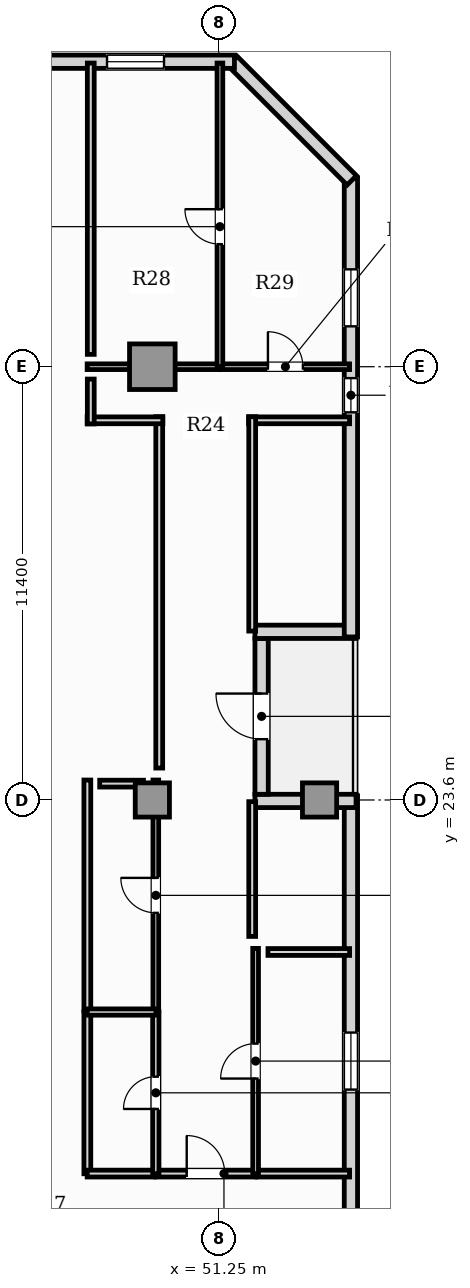
"""IFC4 building model, lengths in metres.
Left out: names, types, materials, properties, quantities, classifications, styles, units other than length and angle.
Written with IfcOpenShell. Run it as: python <this file> out.ifc"""

import sys

from ifc_helpers import new_model, si_unit, direction, frame, frame_2d, origin, origin_2d, place, context, subcontext, project, spatial, rectangle, hollow_rectangle, extrude, element, fill, save


model = new_model("IFC4")
c1 = context("Model", 3, precision=1e-05, world=origin(), true_north=direction((0.0, 1.0)))
c2 = subcontext(c1, "Body", "Model", "MODEL_VIEW")
j1 = project(units=[si_unit("LENGTHUNIT", "METRE"), si_unit("PLANEANGLEUNIT", "RADIAN")], contexts=[c1])
p1 = place(None, origin())
s1 = spatial("IfcSite", under=j1, at=p1, CompositionType="ELEMENT")
p2 = place(p1, origin())
s2 = spatial("IfcBuilding", under=s1, at=p2, CompositionType="ELEMENT")
p3 = place(p2, frame((0.0, 0.0, 96.45)))
s3 = spatial("IfcBuildingStorey", under=s2, at=p3, CompositionType="ELEMENT", Elevation=96.45)
p4 = place(p3, frame((49.5, 35.0, 0.0), z_axis=(0.0, 0.0, 1.0), x_axis=(1.0, 0.0, 0.0)))
e1 = element("IfcColumn", 1, at=p4, inside=s3, PredefinedType="USERDEFINED", context=c2, shape_type="SweptSolid", body=[
    extrude(hollow_rectangle(XDim=1.2, YDim=1.2, WallThickness=0.07, at=origin_2d()), origin(), (0.0, 0.0, 1.0), 3.85),
])
for number, where, z_axis, x_axis in (
    (2, (49.5, 23.6, 0.0), (0.0, 0.0, 1.0), (1.0, 0.0, 0.0)),
    (3, (53.9, 23.6, 0.0), (0.0, 0.0, 1.0), (1.0, 0.0, 0.0)),
):
    element("IfcColumn", number, at=place(p3, frame(where, z_axis=z_axis, x_axis=x_axis)), inside=s3, PredefinedType="COLUMN", context=c2, shape_type="SweptSolid", body=[
        extrude(rectangle(XDim=0.9, YDim=0.9, at=origin_2d()), origin(), (0.0, 0.0, 1.0), 3.85),
    ])
p5 = place(p3, frame((54.725, 3.24, 0.0), z_axis=(0.0, 0.0, 1.0), x_axis=(0.0, 1.0, 0.0)))
e4 = element("IfcWall", 4, at=p5, inside=s3, PredefinedType="SOLIDWALL", context=c2, shape_type="SweptSolid", body=[
    extrude(rectangle(XDim=20.47, YDim=0.35, at=frame_2d((10.235, 0.0))), origin(), (0.0, 0.0, 1.0), 3.6),
])
p6 = place(p5, frame((12.74, 0.0, 0.9)))
e5 = element("IfcOpeningElement", 5, at=p6, cuts=e4, PredefinedType="OPENING", context=c2, shape_type="SweptSolid", body=[
    extrude(rectangle(XDim=1.5, YDim=1.95, at=frame_2d((0.75, 0.975))), frame((0.0, 0.185, 0.0), z_axis=(0.0, -1.0, 0.0), x_axis=(1.0, 0.0, 0.0)), (0.0, 0.0, 1.0), 0.37),
])
p7 = place(p3, frame((54.86, 23.575, 0.0), z_axis=(0.0, 0.0, 1.0), x_axis=(-1.0, 0.0, 0.0)))
e6 = element("IfcWall", 6, at=p7, inside=s3, PredefinedType="SOLIDWALL", context=c2, shape_type="SweptSolid", body=[
    extrude(rectangle(XDim=2.66, YDim=0.35, at=frame_2d((1.33, 0.0))), origin(), (0.0, 0.0, 1.0), 3.056),
])
p8 = place(p3, frame((52.375, 23.75, 0.0), z_axis=(0.0, 0.0, 1.0), x_axis=(0.0, 1.0, 0.0)))
e7 = element("IfcWall", 7, at=p8, inside=s3, PredefinedType="SOLIDWALL", context=c2, shape_type="SweptSolid", body=[
    extrude(rectangle(XDim=4.1, YDim=0.35, at=frame_2d((2.05, 0.0))), origin(), (0.0, 0.0, 1.0), 3.6),
])
p9 = place(p8, frame((1.45, 0.0, 0.0)))
e8 = element("IfcOpeningElement", 8, at=p9, cuts=e7, PredefinedType="OPENING", context=c2, shape_type="SweptSolid", body=[
    extrude(rectangle(XDim=1.2, YDim=2.2, at=frame_2d((0.6, 1.1))), frame((0.0, 0.185, 0.0), z_axis=(0.0, -1.0, 0.0), x_axis=(1.0, 0.0, 0.0)), (0.0, 0.0, 1.0), 0.37),
])
p10 = place(p3, frame((52.2, 28.025, 0.0), z_axis=(0.0, 0.0, 1.0), x_axis=(1.0, 0.0, 0.0)))
e9 = element("IfcWall", 9, at=p10, inside=s3, PredefinedType="SOLIDWALL", context=c2, shape_type="SweptSolid", body=[
    extrude(rectangle(XDim=2.66, YDim=0.35, at=frame_2d((1.33, 0.0))), origin(), (0.0, 0.0, 1.0), 3.6),
])
p11 = place(p3, frame((54.725, 27.89, 0.0), z_axis=(0.0, 0.0, 1.0), x_axis=(0.0, 1.0, 0.0)))
e10 = element("IfcWall", 10, at=p11, inside=s3, PredefinedType="SOLIDWALL", context=c2, shape_type="SweptSolid", body=[
    extrude(rectangle(XDim=12.07, YDim=0.35, at=frame_2d((6.035, 0.0))), origin(), (0.0, 0.0, 1.0), 3.6),
])
p12 = place(p11, frame((5.91, 0.0, 0.95)))
e11 = element("IfcOpeningElement", 11, at=p12, cuts=e10, PredefinedType="OPENING", context=c2, shape_type="SweptSolid", body=[
    extrude(rectangle(XDim=0.9, YDim=1.5, at=frame_2d((0.45, 0.75))), frame((0.0, 0.185, 0.0), z_axis=(0.0, -1.0, 0.0), x_axis=(1.0, 0.0, 0.0)), (0.0, 0.0, 1.0), 0.37),
])
p13 = place(p11, frame((8.173, 0.0, 0.9)))
e12 = element("IfcOpeningElement", 12, at=p13, cuts=e10, PredefinedType="OPENING", context=c2, shape_type="SweptSolid", body=[
    extrude(rectangle(XDim=1.5, YDim=1.95, at=frame_2d((0.75, 0.975))), frame((0.0, 0.185, 0.0), z_axis=(0.0, -1.0, 0.0), x_axis=(1.0, 0.0, 0.0)), (0.0, 0.0, 1.0), 0.37),
])
p14 = place(p3, frame((54.748, 39.905, 0.0), z_axis=(0.0, 0.0, 1.0), x_axis=(-0.707106781187, 0.707106781187, 0.0)))
e13 = element("IfcWall", 13, at=p14, inside=s3, PredefinedType="SOLIDWALL", context=c2, shape_type="SweptSolid", body=[
    extrude(rectangle(XDim=4.446, YDim=0.35, at=frame_2d((2.223, 0.0))), origin(), (0.0, 0.0, 1.0), 3.6),
])
p15 = place(p3, frame((51.66, 43.025, 0.0), z_axis=(0.0, 0.0, 1.0), x_axis=(-1.0, 0.0, 0.0)))
e14 = element("IfcWall", 14, at=p15, inside=s3, PredefinedType="SOLIDWALL", context=c2, shape_type="SweptSolid", body=[
    extrude(rectangle(XDim=45.82, YDim=0.35, at=frame_2d((22.91, 0.0))), origin(), (0.0, 0.0, 1.0), 3.6),
])
p16 = place(p15, frame((42.468, 0.0, 0.9)))
e15 = element("IfcOpeningElement", 15, at=p16, cuts=e14, PredefinedType="OPENING", context=c2, shape_type="SweptSolid", body=[
    extrude(rectangle(XDim=1.5, YDim=1.95, at=frame_2d((0.75, 0.975))), frame((0.0, 0.185, 0.0), z_axis=(0.0, -1.0, 0.0), x_axis=(1.0, 0.0, 0.0)), (0.0, 0.0, 1.0), 0.37),
])
p17 = place(p15, frame((1.853, 0.0, 0.9)))
e16 = element("IfcOpeningElement", 16, at=p17, cuts=e14, PredefinedType="OPENING", context=c2, shape_type="SweptSolid", body=[
    extrude(rectangle(XDim=1.5, YDim=1.95, at=frame_2d((0.75, 0.975))), frame((0.0, 0.185, 0.0), z_axis=(0.0, -1.0, 0.0), x_axis=(1.0, 0.0, 0.0)), (0.0, 0.0, 1.0), 0.37),
])
p18 = place(p15, frame((36.578, 0.0, 0.9)))
e17 = element("IfcOpeningElement", 17, at=p18, cuts=e14, PredefinedType="OPENING", context=c2, shape_type="SweptSolid", body=[
    extrude(rectangle(XDim=1.5, YDim=1.95, at=frame_2d((0.75, 0.975))), frame((0.0, 0.185, 0.0), z_axis=(0.0, -1.0, 0.0), x_axis=(1.0, 0.0, 0.0)), (0.0, 0.0, 1.0), 0.37),
])
p19 = place(p15, frame((31.898, 0.0, 0.9)))
e18 = element("IfcOpeningElement", 18, at=p19, cuts=e14, PredefinedType="OPENING", context=c2, shape_type="SweptSolid", body=[
    extrude(rectangle(XDim=1.5, YDim=1.95, at=frame_2d((0.75, 0.975))), frame((0.0, 0.185, 0.0), z_axis=(0.0, -1.0, 0.0), x_axis=(1.0, 0.0, 0.0)), (0.0, 0.0, 1.0), 0.37),
])
p20 = place(p15, frame((27.837, 0.0, 0.9)))
e19 = element("IfcOpeningElement", 19, at=p20, cuts=e14, PredefinedType="OPENING", context=c2, shape_type="SweptSolid", body=[
    extrude(rectangle(XDim=1.5, YDim=1.95, at=frame_2d((0.75, 0.975))), frame((0.0, 0.185, 0.0), z_axis=(0.0, -1.0, 0.0), x_axis=(1.0, 0.0, 0.0)), (0.0, 0.0, 1.0), 0.37),
])
p21 = place(p15, frame((24.236, 0.0, 0.9)))
e20 = element("IfcOpeningElement", 20, at=p21, cuts=e14, PredefinedType="OPENING", context=c2, shape_type="SweptSolid", body=[
    extrude(rectangle(XDim=1.5, YDim=1.95, at=frame_2d((0.75, 0.975))), frame((0.0, 0.185, 0.0), z_axis=(0.0, -1.0, 0.0), x_axis=(1.0, 0.0, 0.0)), (0.0, 0.0, 1.0), 0.37),
])
p22 = place(p15, frame((19.927, 0.0, 0.9)))
e21 = element("IfcOpeningElement", 21, at=p22, cuts=e14, PredefinedType="OPENING", context=c2, shape_type="SweptSolid", body=[
    extrude(rectangle(XDim=1.5, YDim=1.95, at=frame_2d((0.75, 0.975))), frame((0.0, 0.185, 0.0), z_axis=(0.0, -1.0, 0.0), x_axis=(1.0, 0.0, 0.0)), (0.0, 0.0, 1.0), 0.37),
])
p23 = place(p15, frame((15.381, 0.0, 0.9)))
e22 = element("IfcOpeningElement", 22, at=p23, cuts=e14, PredefinedType="OPENING", context=c2, shape_type="SweptSolid", body=[
    extrude(rectangle(XDim=1.5, YDim=1.95, at=frame_2d((0.75, 0.975))), frame((0.0, 0.185, 0.0), z_axis=(0.0, -1.0, 0.0), x_axis=(1.0, 0.0, 0.0)), (0.0, 0.0, 1.0), 0.37),
])
p24 = place(p15, frame((11.477, 0.0, 0.9)))
e23 = element("IfcOpeningElement", 23, at=p24, cuts=e14, PredefinedType="OPENING", context=c2, shape_type="SweptSolid", body=[
    extrude(rectangle(XDim=1.5, YDim=1.95, at=frame_2d((0.75, 0.975))), frame((0.0, 0.185, 0.0), z_axis=(0.0, -1.0, 0.0), x_axis=(1.0, 0.0, 0.0)), (0.0, 0.0, 1.0), 0.37),
])
p25 = place(p15, frame((7.445, 0.0, 0.9)))
e24 = element("IfcOpeningElement", 24, at=p25, cuts=e14, PredefinedType="OPENING", context=c2, shape_type="SweptSolid", body=[
    extrude(rectangle(XDim=1.5, YDim=1.95, at=frame_2d((0.75, 0.975))), frame((0.0, 0.185, 0.0), z_axis=(0.0, -1.0, 0.0), x_axis=(1.0, 0.0, 0.0)), (0.0, 0.0, 1.0), 0.37),
])
p26 = place(p3, frame((49.587, 13.77, 0.0), z_axis=(0.0, 0.0, 1.0), x_axis=(1.0, 0.0, 0.0)))
e25 = element("IfcWall", 25, at=p26, inside=s3, PredefinedType="PARTITIONING", context=c2, shape_type="SweptSolid", body=[
    extrude(rectangle(XDim=2.636, YDim=0.18, at=frame_2d((1.318, 0.0))), origin(), (0.0, 0.0, 1.0), 3.6),
])
p27 = place(p26, frame((0.818, 0.0, 0.0)))
e26 = element("IfcOpeningElement", 26, at=p27, cuts=e25, PredefinedType="OPENING", context=c2, shape_type="SweptSolid", body=[
    extrude(rectangle(XDim=1.0, YDim=2.15, at=frame_2d((0.5, 1.075))), frame((0.0, 0.1, 0.0), z_axis=(0.0, -1.0, 0.0), x_axis=(1.0, 0.0, 0.0)), (0.0, 0.0, 1.0), 0.2),
])
p28 = place(p3, frame((47.79, 13.765, 0.0), z_axis=(0.0, 0.0, 1.0), x_axis=(0.0, 1.0, 0.0)))
e27 = element("IfcWall", 27, at=p28, inside=s3, PredefinedType="PARTITIONING", context=c2, shape_type="SweptSolid", body=[
    extrude(rectangle(XDim=4.26, YDim=0.18, at=frame_2d((2.13, 0.0))), origin(), (0.0, 0.0, 1.0), 3.6),
])
p29 = place(p3, frame((47.785, 13.77, 0.0), z_axis=(0.0, 0.0, 1.0), x_axis=(1.0, 0.0, 0.0)))
e28 = element("IfcWall", 28, at=p29, inside=s3, PredefinedType="PARTITIONING", context=c2, shape_type="SweptSolid", body=[
    extrude(rectangle(XDim=1.772, YDim=0.18, at=frame_2d((0.886, 0.0))), origin(), (0.0, 0.0, 1.0), 3.6),
])
p30 = place(p3, frame((47.79, 18.055, 0.0), z_axis=(0.0, 0.0, 1.0), x_axis=(0.0, 1.0, 0.0)))
e29 = element("IfcWall", 29, at=p30, inside=s3, PredefinedType="PARTITIONING", context=c2, shape_type="SweptSolid", body=[
    extrude(rectangle(XDim=6.07, YDim=0.18, at=frame_2d((3.035, 0.0))), origin(), (0.0, 0.0, 1.0), 3.6),
])
p31 = place(p3, frame((52.253, 13.77, 0.0), z_axis=(0.0, 0.0, 1.0), x_axis=(1.0, 0.0, 0.0)))
e30 = element("IfcWall", 30, at=p31, inside=s3, PredefinedType="PARTITIONING", context=c2, shape_type="SweptSolid", body=[
    extrude(rectangle(XDim=2.437, YDim=0.18, at=frame_2d((1.219, 0.0))), origin(), (0.0, 0.0, 1.0), 3.6),
])
p32 = place(p3, frame((49.592, 13.765, 0.0), z_axis=(0.0, 0.0, 1.0), x_axis=(0.0, 1.0, 0.0)))
e31 = element("IfcWall", 31, at=p32, inside=s3, PredefinedType="PLUMBINGWALL", context=c2, shape_type="SweptSolid", body=[
    extrude(rectangle(XDim=4.26, YDim=0.165, at=frame_2d((2.13, 0.0))), origin(), (0.0, 0.0, 1.0), 3.056),
])
p33 = place(p32, frame((1.705, 0.0, 0.0)))
e32 = element("IfcOpeningElement", 32, at=p33, cuts=e31, PredefinedType="OPENING", context=c2, shape_type="SweptSolid", body=[
    extrude(rectangle(XDim=0.85, YDim=2.1, at=frame_2d((0.425, 1.05))), frame((0.0, 0.093, 0.0), z_axis=(0.0, -1.0, 0.0), x_axis=(1.0, 0.0, 0.0)), (0.0, 0.0, 1.0), 0.185),
])
p34 = place(p3, frame((49.592, 18.055, 0.0), z_axis=(0.0, 0.0, 1.0), x_axis=(0.0, 1.0, 0.0)))
e33 = element("IfcWall", 33, at=p34, inside=s3, PredefinedType="PARTITIONING", context=c2, shape_type="SweptSolid", body=[
    extrude(rectangle(XDim=6.07, YDim=0.15, at=frame_2d((3.035, 0.0))), origin(), (0.0, 0.0, 1.0), 3.056),
])
p35 = place(p34, frame((2.575, 0.0, 0.0)))
e34 = element("IfcOpeningElement", 34, at=p35, cuts=e33, PredefinedType="OPENING", context=c2, shape_type="SweptSolid", body=[
    extrude(rectangle(XDim=0.92, YDim=2.1, at=frame_2d((0.46, 1.05))), frame((0.0, 0.085, 0.0), z_axis=(0.0, -1.0, 0.0), x_axis=(1.0, 0.0, 0.0)), (0.0, 0.0, 1.0), 0.17),
])
p36 = place(p3, frame((52.218, 13.765, 0.0), z_axis=(0.0, 0.0, 1.0), x_axis=(0.0, 1.0, 0.0)))
e35 = element("IfcWall", 35, at=p36, inside=s3, PredefinedType="PARTITIONING", context=c2, shape_type="SweptSolid", body=[
    extrude(rectangle(XDim=5.93, YDim=0.15, at=frame_2d((2.965, 0.0))), origin(), (0.0, 0.0, 1.0), 3.6),
])
p37 = place(p36, frame((2.505, 0.0, 0.0)))
e36 = element("IfcOpeningElement", 36, at=p37, cuts=e35, PredefinedType="OPENING", context=c2, shape_type="SweptSolid", body=[
    extrude(rectangle(XDim=0.92, YDim=2.1, at=frame_2d((0.46, 1.05))), frame((0.0, 0.085, 0.0), z_axis=(0.0, -1.0, 0.0), x_axis=(1.0, 0.0, 0.0)), (0.0, 0.0, 1.0), 0.17),
])
p38 = place(p3, frame((47.785, 35.0, 0.0), z_axis=(0.0, 0.0, 1.0), x_axis=(1.0, 0.0, 0.0)))
e37 = element("IfcWall", 37, at=p38, inside=s3, PredefinedType="PARTITIONING", context=c2, shape_type="SweptSolid", body=[
    extrude(rectangle(XDim=3.498, YDim=0.15, at=frame_2d((1.749, 0.0))), origin(), (0.0, 0.0, 1.0), 2.983),
])
p39 = place(p3, frame((51.313, 35.0, 0.0), z_axis=(0.0, 0.0, 1.0), x_axis=(1.0, 0.0, 0.0)))
e38 = element("IfcWall", 38, at=p39, inside=s3, PredefinedType="PARTITIONING", context=c2, shape_type="SweptSolid", body=[
    extrude(rectangle(XDim=3.377, YDim=0.15, at=frame_2d((1.688, 0.0))), origin(), (0.0, 0.0, 1.0), 3.6),
])
p40 = place(p39, frame((1.229, 0.0, 0.0)))
e39 = element("IfcOpeningElement", 39, at=p40, cuts=e38, PredefinedType="OPENING", context=c2, shape_type="SweptSolid", body=[
    extrude(rectangle(XDim=0.92, YDim=2.1, at=frame_2d((0.46, 1.05))), frame((0.0, 0.085, 0.0), z_axis=(0.0, -1.0, 0.0), x_axis=(1.0, 0.0, 0.0)), (0.0, 0.0, 1.0), 0.17),
])
p41 = place(p3, frame((47.785, 18.02, 0.0), z_axis=(0.0, 0.0, 1.0), x_axis=(1.0, 0.0, 0.0)))
e40 = element("IfcWall", 40, at=p41, inside=s3, PredefinedType="PLUMBINGWALL", context=c2, shape_type="SweptSolid", body=[
    extrude(rectangle(XDim=1.812, YDim=0.165, at=frame_2d((0.906, 0.0))), origin(), (0.0, 0.0, 1.0), 3.6),
])
p42 = place(p3, frame((51.278, 34.995, 0.0), z_axis=(0.0, 0.0, 1.0), x_axis=(0.0, 1.0, 0.0)))
e41 = element("IfcWall", 41, at=p42, inside=s3, PredefinedType="PARTITIONING", context=c2, shape_type="SweptSolid", body=[
    extrude(rectangle(XDim=7.995, YDim=0.15, at=frame_2d((3.998, 0.0))), origin(), (0.0, 0.0, 1.0), 3.6),
])
p43 = place(p42, frame((3.23, 0.0, 0.0)))
e42 = element("IfcOpeningElement", 42, at=p43, cuts=e41, PredefinedType="OPENING", context=c2, shape_type="SweptSolid", body=[
    extrude(rectangle(XDim=0.92, YDim=2.1, at=frame_2d((0.46, 1.05))), frame((0.0, 0.085, 0.0), z_axis=(0.0, -1.0, 0.0), x_axis=(1.0, 0.0, 0.0)), (0.0, 0.0, 1.0), 0.17),
])
p44 = place(p3, frame((49.682, 24.44, 0.0), z_axis=(0.0, 0.0, 1.0), x_axis=(0.0, 1.0, 0.0)))
e43 = element("IfcWall", 43, at=p44, inside=s3, PredefinedType="PARTITIONING", context=c2, shape_type="SweptSolid", body=[
    extrude(rectangle(XDim=9.245, YDim=0.18, at=frame_2d((4.623, 0.0))), origin(), (0.0, 0.0, 1.0), 3.056),
])
p45 = place(p3, frame((49.777, 33.59, 0.0), z_axis=(0.0, 0.0, 1.0), x_axis=(-1.0, 0.0, 0.0)))
e44 = element("IfcWall", 44, at=p45, inside=s3, PredefinedType="PARTITIONING", context=c2, shape_type="SweptSolid", body=[
    extrude(rectangle(XDim=1.992, YDim=0.18, at=frame_2d((0.996, 0.0))), origin(), (0.0, 0.0, 1.0), 3.6),
])
p46 = place(p3, frame((47.88, 33.495, 0.0), z_axis=(0.0, 0.0, 1.0), x_axis=(0.0, 1.0, 0.0)))
e45 = element("IfcWall", 45, at=p46, inside=s3, PredefinedType="PARTITIONING", context=c2, shape_type="SweptSolid", body=[
    extrude(rectangle(XDim=1.18, YDim=0.18, at=frame_2d((0.59, 0.0))), origin(), (0.0, 0.0, 1.0), 3.6),
])
p47 = place(p3, frame((54.69, 33.59, 0.0), z_axis=(0.0, 0.0, 1.0), x_axis=(-1.0, 0.0, 0.0)))
e46 = element("IfcWall", 46, at=p47, inside=s3, PredefinedType="PARTITIONING", context=c2, shape_type="SweptSolid", body=[
    extrude(rectangle(XDim=2.657, YDim=0.18, at=frame_2d((1.329, 0.0))), origin(), (0.0, 0.0, 1.0), 3.6),
])
p48 = place(p3, frame((52.128, 33.685, 0.0), z_axis=(0.0, 0.0, 1.0), x_axis=(0.0, -1.0, 0.0)))
e47 = element("IfcWall", 47, at=p48, inside=s3, PredefinedType="PARTITIONING", context=c2, shape_type="SweptSolid", body=[
    extrude(rectangle(XDim=5.641, YDim=0.18, at=frame_2d((2.82, 0.0))), origin(), (0.0, 0.0, 1.0), 3.6),
])
p49 = place(p3, frame((52.128, 23.556, 0.0), z_axis=(0.0, 0.0, 1.0), x_axis=(0.0, -1.0, 0.0)))
e48 = element("IfcWall", 48, at=p49, inside=s3, PredefinedType="PARTITIONING", context=c2, shape_type="SweptSolid", body=[
    extrude(rectangle(XDim=3.546, YDim=0.18, at=frame_2d((1.773, 0.0))), origin(), (0.0, 0.0, 1.0), 3.6),
])
p50 = place(p3, frame((48.115, 24.03, 0.0), z_axis=(0.0, 0.0, 1.0), x_axis=(1.0, 0.0, 0.0)))
e49 = element("IfcWall", 49, at=p50, inside=s3, PredefinedType="PARTITIONING", context=c2, shape_type="SweptSolid", body=[
    extrude(rectangle(XDim=1.152, YDim=0.18, at=frame_2d((0.576, 0.0))), origin(), (0.0, 0.0, 1.0), 3.6),
])
p51 = place(p3, frame((52.542, 19.6, 0.0), z_axis=(0.0, 0.0, 1.0), x_axis=(1.0, 0.0, 0.0)))
e50 = element("IfcWall", 50, at=p51, inside=s3, PredefinedType="PARTITIONING", context=c2, shape_type="SweptSolid", body=[
    extrude(rectangle(XDim=2.147, YDim=0.18, at=frame_2d((1.074, 0.0))), origin(), (0.0, 0.0, 1.0), 3.6),
])
p52 = place(p3, frame((47.88, 35.325, 0.0), z_axis=(0.0, 0.0, 1.0), x_axis=(0.0, 1.0, 0.0)))
e51 = element("IfcWall", 51, at=p52, inside=s3, PredefinedType="PARTITIONING", context=c2, shape_type="SweptSolid", body=[
    extrude(rectangle(XDim=7.665, YDim=0.18, at=frame_2d((3.833, 0.0))), origin(), (0.0, 0.0, 1.0), 3.6),
])
p53 = place(p9, frame((1.2, 0.0, 0.0), z_axis=(0.0, 0.0, 1.0), x_axis=(-1.0, 0.0, 0.0)))
e52 = element("IfcDoor", 52, at=p53, inside=s3, OperationType="SINGLE_SWING_LEFT", PredefinedType="DOOR", context=c2, shape_type="SweptSolid", body=[
    extrude(rectangle(XDim=1.2, YDim=2.2, at=frame_2d((0.6, 1.1))), frame((0.0, 0.025, 0.0), z_axis=(0.0, -1.0, 0.0), x_axis=(1.0, 0.0, 0.0)), (0.0, 0.0, 1.0), 0.05),
])
fill(e8, e52)
p54 = place(p12, origin())
e53 = element("IfcWindow", 53, at=p54, inside=s3, PartitioningType="SINGLE_PANEL", PredefinedType="WINDOW", context=c2, shape_type="SweptSolid", body=[
    extrude(rectangle(XDim=0.9, YDim=1.5, at=frame_2d((0.45, 0.75))), frame((0.0, 0.03, 0.0), z_axis=(0.0, -1.0, 0.0), x_axis=(1.0, 0.0, 0.0)), (0.0, 0.0, 1.0), 0.06),
])
fill(e11, e53)
p55 = place(p6, origin())
e54 = element("IfcWindow", 54, at=p55, inside=s3, PartitioningType="SINGLE_PANEL", PredefinedType="WINDOW", context=c2, shape_type="SweptSolid", body=[
    extrude(rectangle(XDim=1.5, YDim=1.95, at=frame_2d((0.75, 0.975))), frame((0.0, 0.03, 0.0), z_axis=(0.0, -1.0, 0.0), x_axis=(1.0, 0.0, 0.0)), (0.0, 0.0, 1.0), 0.06),
])
fill(e5, e54)
p56 = place(p17, origin())
e55 = element("IfcWindow", 55, at=p56, inside=s3, PartitioningType="SINGLE_PANEL", PredefinedType="WINDOW", context=c2, shape_type="SweptSolid", body=[
    extrude(rectangle(XDim=1.5, YDim=1.95, at=frame_2d((0.75, 0.975))), frame((0.0, 0.03, 0.0), z_axis=(0.0, -1.0, 0.0), x_axis=(1.0, 0.0, 0.0)), (0.0, 0.0, 1.0), 0.06),
])
fill(e16, e55)
p57 = place(p13, origin())
e56 = element("IfcWindow", 56, at=p57, inside=s3, PartitioningType="SINGLE_PANEL", PredefinedType="WINDOW", context=c2, shape_type="SweptSolid", body=[
    extrude(rectangle(XDim=1.5, YDim=1.95, at=frame_2d((0.75, 0.975))), frame((0.0, 0.03, 0.0), z_axis=(0.0, -1.0, 0.0), x_axis=(1.0, 0.0, 0.0)), (0.0, 0.0, 1.0), 0.06),
])
fill(e12, e56)
p58 = place(p27, origin())
e57 = element("IfcDoor", 57, at=p58, inside=s3, OperationType="SINGLE_SWING_LEFT", PredefinedType="DOOR", context=c2, shape_type="SweptSolid", body=[
    extrude(rectangle(XDim=1.0, YDim=2.15, at=frame_2d((0.5, 1.075))), frame((0.0, 0.025, 0.0), z_axis=(0.0, -1.0, 0.0), x_axis=(1.0, 0.0, 0.0)), (0.0, 0.0, 1.0), 0.05),
])
fill(e26, e57)
p59 = place(p33, origin())
e58 = element("IfcDoor", 58, at=p59, inside=s3, OperationType="SINGLE_SWING_LEFT", PredefinedType="DOOR", context=c2, shape_type="SweptSolid", body=[
    extrude(rectangle(XDim=0.85, YDim=2.1, at=frame_2d((0.425, 1.05))), frame((0.0, 0.025, 0.0), z_axis=(0.0, -1.0, 0.0), x_axis=(1.0, 0.0, 0.0)), (0.0, 0.0, 1.0), 0.05),
])
fill(e32, e58)
p60 = place(p35, origin())
e59 = element("IfcDoor", 59, at=p60, inside=s3, OperationType="SINGLE_SWING_RIGHT", PredefinedType="DOOR", context=c2, shape_type="SweptSolid", body=[
    extrude(rectangle(XDim=0.92, YDim=2.1, at=frame_2d((0.46, 1.05))), frame((0.0, 0.025, 0.0), z_axis=(0.0, -1.0, 0.0), x_axis=(1.0, 0.0, 0.0)), (0.0, 0.0, 1.0), 0.05),
])
fill(e34, e59)
p61 = place(p37, origin())
e60 = element("IfcDoor", 60, at=p61, inside=s3, OperationType="SINGLE_SWING_LEFT", PredefinedType="DOOR", context=c2, shape_type="SweptSolid", body=[
    extrude(rectangle(XDim=0.92, YDim=2.1, at=frame_2d((0.46, 1.05))), frame((0.0, 0.025, 0.0), z_axis=(0.0, -1.0, 0.0), x_axis=(1.0, 0.0, 0.0)), (0.0, 0.0, 1.0), 0.05),
])
fill(e36, e60)
p62 = place(p40, origin())
e61 = element("IfcDoor", 61, at=p62, inside=s3, OperationType="SINGLE_SWING_LEFT", PredefinedType="DOOR", context=c2, shape_type="SweptSolid", body=[
    extrude(rectangle(XDim=0.92, YDim=2.1, at=frame_2d((0.46, 1.05))), frame((0.0, 0.025, 0.0), z_axis=(0.0, -1.0, 0.0), x_axis=(1.0, 0.0, 0.0)), (0.0, 0.0, 1.0), 0.05),
])
fill(e39, e61)
p63 = place(p43, origin())
e62 = element("IfcDoor", 62, at=p63, inside=s3, OperationType="SINGLE_SWING_RIGHT", PredefinedType="DOOR", context=c2, shape_type="SweptSolid", body=[
    extrude(rectangle(XDim=0.92, YDim=2.1, at=frame_2d((0.46, 1.05))), frame((0.0, 0.025, 0.0), z_axis=(0.0, -1.0, 0.0), x_axis=(1.0, 0.0, 0.0)), (0.0, 0.0, 1.0), 0.05),
])
fill(e42, e62)
save(model, sys.argv[1])
